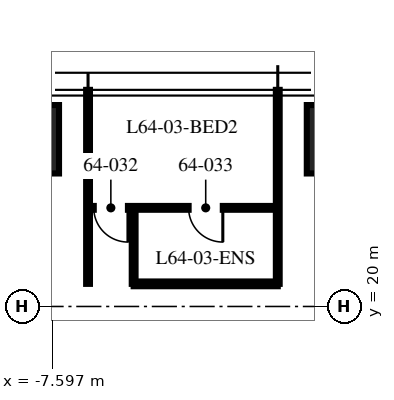
"""IFC4 building model, lengths in metres.
Left out: names, types, materials, properties, quantities, classifications, styles, units other than length and angle.
Written with IfcOpenShell. Run it as: python <this file> out.ifc"""

import sys

from ifc_helpers import new_model, si_unit, direction, frame, frame_2d, origin, origin_2d, place, context, subcontext, project, spatial, rectangle, extrude, element, fill, save


model = new_model("IFC4")
c1 = context("Model", 3, precision=1e-05, world=origin(), true_north=direction((0.0, 1.0)))
c2 = subcontext(c1, "Body", "Model", "MODEL_VIEW")
j1 = project(units=[si_unit("LENGTHUNIT", "METRE"), si_unit("PLANEANGLEUNIT", "RADIAN")], contexts=[c1])
p1 = place(None, origin())
s1 = spatial("IfcSite", under=j1, at=p1, CompositionType="ELEMENT")
p2 = place(p1, origin())
s2 = spatial("IfcBuilding", under=s1, at=p2, CompositionType="ELEMENT")
p3 = place(p2, frame((0.0, 0.0, 255.75)))
s3 = spatial("IfcBuildingStorey", under=s2, at=p3, CompositionType="ELEMENT", Elevation=255.75)
for number, where, z_axis, x_axis in (
    (1, (-8.32, 24.4, 0.0), (0.0, 0.0, 1.0), (1.0, 0.0, 0.0)),
    (2, (0.0, 24.4, 0.0), (0.0, 0.0, 1.0), (1.0, 0.0, 0.0)),
):
    element("IfcColumn", number, at=place(p3, frame(where, z_axis=z_axis, x_axis=x_axis)), inside=s3, PredefinedType="COLUMN", context=c2, shape_type="SweptSolid", body=[
        extrude(rectangle(XDim=1.8, YDim=1.8, at=origin_2d()), origin(), (0.0, 0.0, 1.0), 3.75),
    ])
for number, where, z_axis, x_axis in (
    (3, (-1.664, 20.595, 0.0), (0.0, 0.0, 1.0), (0.0, 1.0, 0.0)),
    (4, (-6.656, 20.595, 0.0), (0.0, 0.0, 1.0), (0.0, 1.0, 0.0)),
):
    element("IfcWall", number, at=place(p3, frame(where, z_axis=z_axis, x_axis=x_axis)), inside=s3, PredefinedType="PARTITIONING", context=c2, shape_type="SweptSolid", body=[
        extrude(rectangle(XDim=5.105, YDim=0.1, at=frame_2d((2.552, 0.0))), origin(), (0.0, 0.0, 1.0), 2.91),
    ])
p4 = place(p3, frame((-1.664, 22.595, 0.0), z_axis=(0.0, 0.0, 1.0), x_axis=(-1.0, 0.0, 0.0)))
e5 = element("IfcWall", 5, at=p4, inside=s3, PredefinedType="PARTITIONING", context=c2, shape_type="SweptSolid", body=[
    extrude(rectangle(XDim=4.992, YDim=0.1, at=frame_2d((2.496, 0.0))), origin(), (0.0, 0.0, 1.0), 2.81),
])
p5 = place(p4, frame((3.942, 0.0, 0.0)))
e6 = element("IfcOpeningElement", 6, at=p5, cuts=e5, PredefinedType="OPENING", context=c2, shape_type="SweptSolid", body=[
    extrude(rectangle(XDim=0.9, YDim=2.1, at=frame_2d((0.45, 1.05))), frame((0.0, 0.06, 0.0), z_axis=(0.0, -1.0, 0.0), x_axis=(1.0, 0.0, 0.0)), (0.0, 0.0, 1.0), 0.12),
])
p6 = place(p4, frame((1.446, 0.0, 0.0)))
e7 = element("IfcOpeningElement", 7, at=p6, cuts=e5, PredefinedType="OPENING", context=c2, shape_type="SweptSolid", body=[
    extrude(rectangle(XDim=0.9, YDim=2.1, at=frame_2d((0.45, 1.05))), frame((0.0, 0.06, 0.0), z_axis=(0.0, -1.0, 0.0), x_axis=(1.0, 0.0, 0.0)), (0.0, 0.0, 1.0), 0.12),
])
p7 = place(p3, frame((-5.456, 20.595, 0.0), z_axis=(0.0, 0.0, 1.0), x_axis=(0.0, 1.0, 0.0)))
e8 = element("IfcWall", 8, at=p7, inside=s3, PredefinedType="PARTITIONING", context=c2, shape_type="SweptSolid", body=[
    extrude(rectangle(XDim=2.0, YDim=0.1, at=frame_2d((1.0, 0.0))), origin(), (0.0, 0.0, 1.0), 3.5),
])
p8 = place(p3, frame((-1.664, 20.595, 0.0), z_axis=(0.0, 0.0, 1.0), x_axis=(-1.0, 0.0, 0.0)))
e9 = element("IfcWall", 9, at=p8, inside=s3, PredefinedType="PARTITIONING", context=c2, shape_type="SweptSolid", body=[
    extrude(rectangle(XDim=3.792, YDim=0.125, at=frame_2d((1.896, 0.0))), origin(), (0.0, 0.0, 1.0), 2.81),
])
p9 = place(p5, origin())
e10 = element("IfcDoor", 10, at=p9, inside=s3, OperationType="SINGLE_SWING_LEFT", PredefinedType="DOOR", context=c2, shape_type="SweptSolid", body=[
    extrude(rectangle(XDim=0.9, YDim=2.1, at=frame_2d((0.45, 1.05))), frame((0.0, 0.025, 0.0), z_axis=(0.0, -1.0, 0.0), x_axis=(1.0, 0.0, 0.0)), (0.0, 0.0, 1.0), 0.05),
])
fill(e6, e10)
p10 = place(p6, origin())
e11 = element("IfcDoor", 11, at=p10, inside=s3, OperationType="SINGLE_SWING_LEFT", PredefinedType="DOOR", context=c2, shape_type="SweptSolid", body=[
    extrude(rectangle(XDim=0.9, YDim=2.1, at=frame_2d((0.45, 1.05))), frame((0.0, 0.025, 0.0), z_axis=(0.0, -1.0, 0.0), x_axis=(1.0, 0.0, 0.0)), (0.0, 0.0, 1.0), 0.05),
])
fill(e7, e11)
save(model, sys.argv[1])
